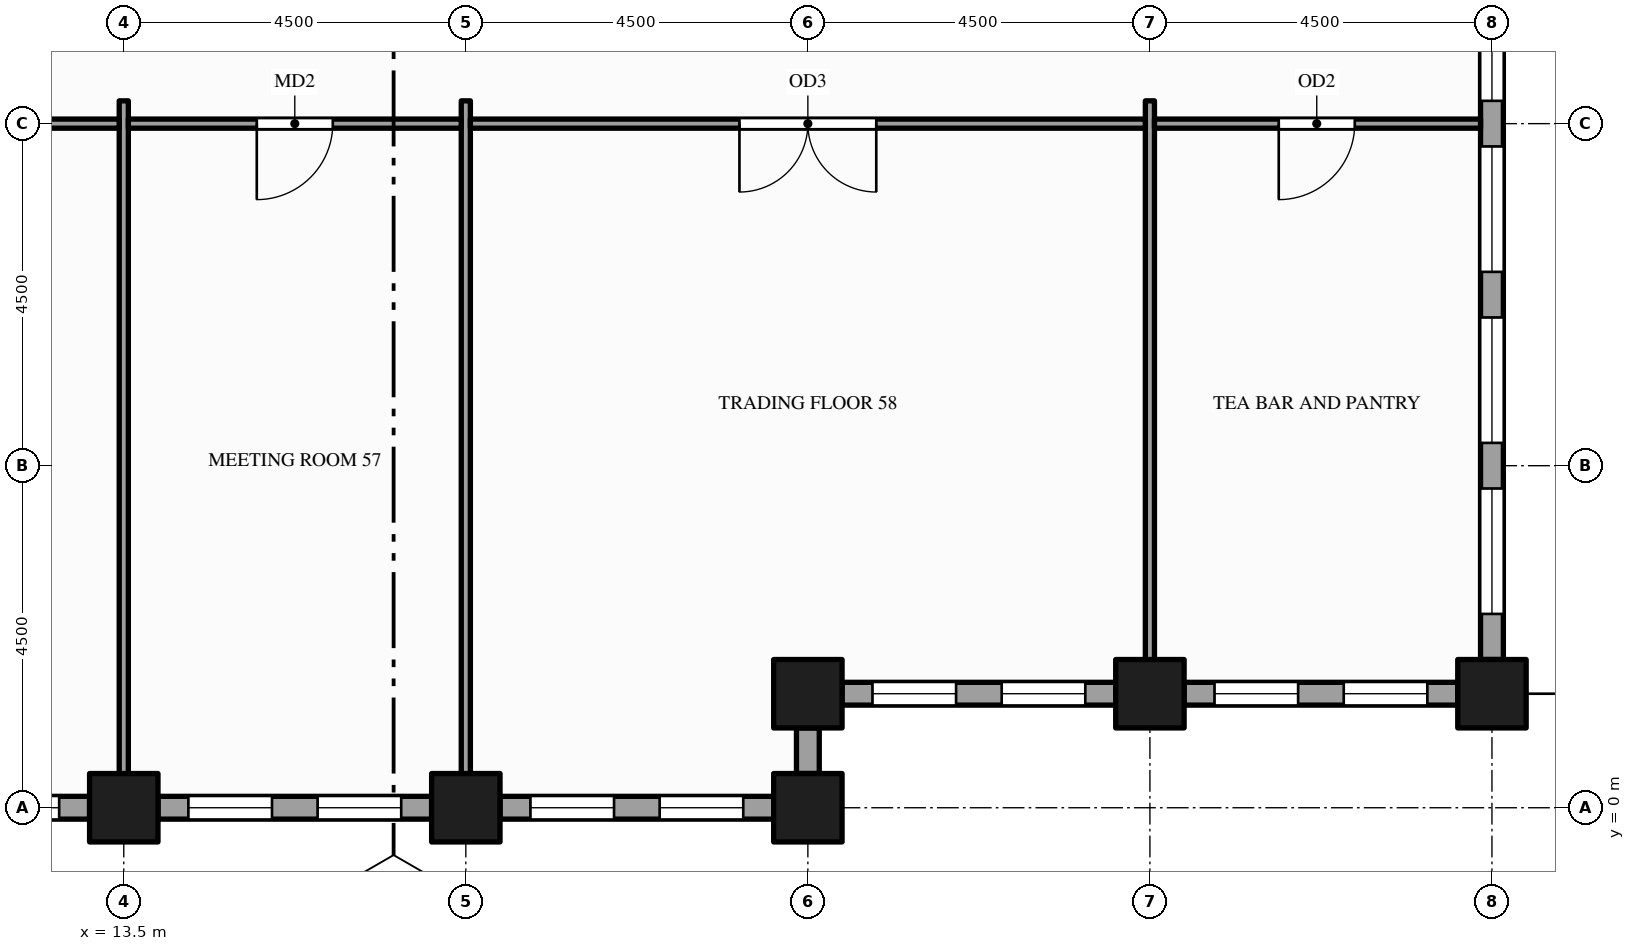
"""IFC4 building model, lengths in metres.
Left out: names, types, materials, properties, quantities, classifications, styles, units other than length and angle.
Written with IfcOpenShell. Run it as: python <this file> out.ifc"""

import sys

from ifc_helpers import new_model, si_unit, direction, frame, frame_2d, origin, origin_2d, place, context, subcontext, project, spatial, rectangle, hollow_rectangle, extrude, element, fill, save


model = new_model("IFC4")
c1 = context("Model", 3, precision=1e-05, world=origin(), true_north=direction((0.0, 1.0)))
c2 = subcontext(c1, "Body", "Model", "MODEL_VIEW")
j1 = project(units=[si_unit("LENGTHUNIT", "METRE"), si_unit("PLANEANGLEUNIT", "RADIAN")], contexts=[c1])
p1 = place(None, origin())
s1 = spatial("IfcSite", under=j1, at=p1, CompositionType="ELEMENT")
p2 = place(p1, origin())
s2 = spatial("IfcBuilding", under=s1, at=p2, CompositionType="ELEMENT")
p3 = place(p2, frame((0.0, 0.0, 147.0)))
s3 = spatial("IfcBuildingStorey", under=s2, at=p3, CompositionType="ELEMENT", Elevation=147.0)
for number, where, z_axis, x_axis in (
    (1, (13.5, 0.0, -0.15), (0.0, 0.0, 1.0), (1.0, 0.0, 0.0)),
    (2, (18.0, 0.0, -0.15), (0.0, 0.0, 1.0), (1.0, 0.0, 0.0)),
    (3, (22.5, 0.0, -0.15), (0.0, 0.0, 1.0), (1.0, 0.0, 0.0)),
    (4, (22.5, 1.5, -0.15), (0.0, 0.0, 1.0), (1.0, 0.0, 0.0)),
    (5, (27.0, 1.5, -0.15), (0.0, 0.0, 1.0), (1.0, 0.0, 0.0)),
    (6, (31.5, 1.5, -0.15), (0.0, 0.0, 1.0), (1.0, 0.0, 0.0)),
):
    element("IfcColumn", number, at=place(p3, frame(where, z_axis=z_axis, x_axis=x_axis)), inside=s3, PredefinedType="COLUMN", context=c2, shape_type="SweptSolid", body=[
        extrude(hollow_rectangle(XDim=0.9, YDim=0.9, WallThickness=0.045, at=origin_2d()), origin(), (0.0, 0.0, 1.0), 4.0),
    ])
p4 = place(p3, frame((9.45, 0.0, 0.0), z_axis=(0.0, 0.0, 1.0), x_axis=(1.0, 0.0, 0.0)))
e7 = element("IfcWall", 7, at=p4, inside=s3, PredefinedType="STANDARD", context=c2, shape_type="SweptSolid", body=[
    extrude(rectangle(XDim=3.6, YDim=0.3, at=frame_2d((1.8, 0.0))), origin(), (0.0, 0.0, 1.0), 2.87),
])
p5 = place(p4, frame((0.4, 0.0, 0.9)))
e8 = element("IfcOpeningElement", 8, at=p5, cuts=e7, PredefinedType="OPENING", context=c2, shape_type="SweptSolid", body=[
    extrude(rectangle(XDim=1.1, YDim=1.75, at=frame_2d((0.55, 0.875))), frame((0.0, 0.16, 0.0), z_axis=(0.0, -1.0, 0.0), x_axis=(1.0, 0.0, 0.0)), (0.0, 0.0, 1.0), 0.32),
])
p6 = place(p4, frame((2.1, 0.0, 0.9)))
e9 = element("IfcOpeningElement", 9, at=p6, cuts=e7, PredefinedType="OPENING", context=c2, shape_type="SweptSolid", body=[
    extrude(rectangle(XDim=1.1, YDim=1.75, at=frame_2d((0.55, 0.875))), frame((0.0, 0.16, 0.0), z_axis=(0.0, -1.0, 0.0), x_axis=(1.0, 0.0, 0.0)), (0.0, 0.0, 1.0), 0.32),
])
p7 = place(p3, frame((13.95, 0.0, 0.0), z_axis=(0.0, 0.0, 1.0), x_axis=(1.0, 0.0, 0.0)))
e10 = element("IfcWall", 10, at=p7, inside=s3, PredefinedType="STANDARD", context=c2, shape_type="SweptSolid", body=[
    extrude(rectangle(XDim=3.6, YDim=0.3, at=frame_2d((1.8, 0.0))), origin(), (0.0, 0.0, 1.0), 2.87),
])
p8 = place(p7, frame((0.4, 0.0, 0.9)))
e11 = element("IfcOpeningElement", 11, at=p8, cuts=e10, PredefinedType="OPENING", context=c2, shape_type="SweptSolid", body=[
    extrude(rectangle(XDim=1.1, YDim=1.75, at=frame_2d((0.55, 0.875))), frame((0.0, 0.16, 0.0), z_axis=(0.0, -1.0, 0.0), x_axis=(1.0, 0.0, 0.0)), (0.0, 0.0, 1.0), 0.32),
])
p9 = place(p7, frame((2.1, 0.0, 0.9)))
e12 = element("IfcOpeningElement", 12, at=p9, cuts=e10, PredefinedType="OPENING", context=c2, shape_type="SweptSolid", body=[
    extrude(rectangle(XDim=1.1, YDim=1.75, at=frame_2d((0.55, 0.875))), frame((0.0, 0.16, 0.0), z_axis=(0.0, -1.0, 0.0), x_axis=(1.0, 0.0, 0.0)), (0.0, 0.0, 1.0), 0.32),
])
p10 = place(p3, frame((18.45, 0.0, 0.0), z_axis=(0.0, 0.0, 1.0), x_axis=(1.0, 0.0, 0.0)))
e13 = element("IfcWall", 13, at=p10, inside=s3, PredefinedType="STANDARD", context=c2, shape_type="SweptSolid", body=[
    extrude(rectangle(XDim=3.6, YDim=0.3, at=frame_2d((1.8, 0.0))), origin(), (0.0, 0.0, 1.0), 2.87),
])
p11 = place(p10, frame((0.4, 0.0, 0.9)))
e14 = element("IfcOpeningElement", 14, at=p11, cuts=e13, PredefinedType="OPENING", context=c2, shape_type="SweptSolid", body=[
    extrude(rectangle(XDim=1.1, YDim=1.75, at=frame_2d((0.55, 0.875))), frame((0.0, 0.16, 0.0), z_axis=(0.0, -1.0, 0.0), x_axis=(1.0, 0.0, 0.0)), (0.0, 0.0, 1.0), 0.32),
])
p12 = place(p10, frame((2.1, 0.0, 0.9)))
e15 = element("IfcOpeningElement", 15, at=p12, cuts=e13, PredefinedType="OPENING", context=c2, shape_type="SweptSolid", body=[
    extrude(rectangle(XDim=1.1, YDim=1.75, at=frame_2d((0.55, 0.875))), frame((0.0, 0.16, 0.0), z_axis=(0.0, -1.0, 0.0), x_axis=(1.0, 0.0, 0.0)), (0.0, 0.0, 1.0), 0.32),
])
p13 = place(p3, frame((22.5, 0.45, 0.0), z_axis=(0.0, 0.0, 1.0), x_axis=(0.0, 1.0, 0.0)))
e16 = element("IfcWall", 16, at=p13, inside=s3, PredefinedType="STANDARD", context=c2, shape_type="SweptSolid", body=[
    extrude(rectangle(XDim=0.6, YDim=0.3, at=frame_2d((0.3, 0.0))), origin(), (0.0, 0.0, 1.0), 3.149),
])
p14 = place(p3, frame((22.95, 1.5, 0.0), z_axis=(0.0, 0.0, 1.0), x_axis=(1.0, 0.0, 0.0)))
e17 = element("IfcWall", 17, at=p14, inside=s3, PredefinedType="STANDARD", context=c2, shape_type="SweptSolid", body=[
    extrude(rectangle(XDim=3.6, YDim=0.3, at=frame_2d((1.8, 0.0))), origin(), (0.0, 0.0, 1.0), 2.87),
])
p15 = place(p14, frame((0.4, 0.0, 0.9)))
e18 = element("IfcOpeningElement", 18, at=p15, cuts=e17, PredefinedType="OPENING", context=c2, shape_type="SweptSolid", body=[
    extrude(rectangle(XDim=1.1, YDim=1.75, at=frame_2d((0.55, 0.875))), frame((0.0, 0.16, 0.0), z_axis=(0.0, -1.0, 0.0), x_axis=(1.0, 0.0, 0.0)), (0.0, 0.0, 1.0), 0.32),
])
p16 = place(p14, frame((2.1, 0.0, 0.9)))
e19 = element("IfcOpeningElement", 19, at=p16, cuts=e17, PredefinedType="OPENING", context=c2, shape_type="SweptSolid", body=[
    extrude(rectangle(XDim=1.1, YDim=1.75, at=frame_2d((0.55, 0.875))), frame((0.0, 0.16, 0.0), z_axis=(0.0, -1.0, 0.0), x_axis=(1.0, 0.0, 0.0)), (0.0, 0.0, 1.0), 0.32),
])
p17 = place(p3, frame((27.45, 1.5, 0.0), z_axis=(0.0, 0.0, 1.0), x_axis=(1.0, 0.0, 0.0)))
e20 = element("IfcWall", 20, at=p17, inside=s3, PredefinedType="STANDARD", context=c2, shape_type="SweptSolid", body=[
    extrude(rectangle(XDim=3.6, YDim=0.3, at=frame_2d((1.8, 0.0))), origin(), (0.0, 0.0, 1.0), 2.87),
])
p18 = place(p17, frame((0.4, 0.0, 0.9)))
e21 = element("IfcOpeningElement", 21, at=p18, cuts=e20, PredefinedType="OPENING", context=c2, shape_type="SweptSolid", body=[
    extrude(rectangle(XDim=1.1, YDim=1.75, at=frame_2d((0.55, 0.875))), frame((0.0, 0.16, 0.0), z_axis=(0.0, -1.0, 0.0), x_axis=(1.0, 0.0, 0.0)), (0.0, 0.0, 1.0), 0.32),
])
p19 = place(p17, frame((2.1, 0.0, 0.9)))
e22 = element("IfcOpeningElement", 22, at=p19, cuts=e20, PredefinedType="OPENING", context=c2, shape_type="SweptSolid", body=[
    extrude(rectangle(XDim=1.1, YDim=1.75, at=frame_2d((0.55, 0.875))), frame((0.0, 0.16, 0.0), z_axis=(0.0, -1.0, 0.0), x_axis=(1.0, 0.0, 0.0)), (0.0, 0.0, 1.0), 0.32),
])
p20 = place(p3, frame((31.5, 1.95, 0.0), z_axis=(0.0, 0.0, 1.0), x_axis=(0.0, 1.0, 0.0)))
e23 = element("IfcWall", 23, at=p20, inside=s3, PredefinedType="STANDARD", context=c2, shape_type="SweptSolid", body=[
    extrude(rectangle(XDim=21.6, YDim=0.3, at=frame_2d((10.8, 0.0))), origin(), (0.0, 0.0, 1.0), 2.87),
])
p21 = place(p20, frame((0.6, 0.0, 0.9)))
e24 = element("IfcOpeningElement", 24, at=p21, cuts=e23, PredefinedType="OPENING", context=c2, shape_type="SweptSolid", body=[
    extrude(rectangle(XDim=1.65, YDim=1.75, at=frame_2d((0.825, 0.875))), frame((0.0, 0.16, 0.0), z_axis=(0.0, -1.0, 0.0), x_axis=(1.0, 0.0, 0.0)), (0.0, 0.0, 1.0), 0.32),
])
p22 = place(p20, frame((2.85, 0.0, 0.9)))
e25 = element("IfcOpeningElement", 25, at=p22, cuts=e23, PredefinedType="OPENING", context=c2, shape_type="SweptSolid", body=[
    extrude(rectangle(XDim=1.65, YDim=1.75, at=frame_2d((0.825, 0.875))), frame((0.0, 0.16, 0.0), z_axis=(0.0, -1.0, 0.0), x_axis=(1.0, 0.0, 0.0)), (0.0, 0.0, 1.0), 0.32),
])
p23 = place(p20, frame((5.1, 0.0, 0.9)))
e26 = element("IfcOpeningElement", 26, at=p23, cuts=e23, PredefinedType="OPENING", context=c2, shape_type="SweptSolid", body=[
    extrude(rectangle(XDim=1.65, YDim=1.75, at=frame_2d((0.825, 0.875))), frame((0.0, 0.16, 0.0), z_axis=(0.0, -1.0, 0.0), x_axis=(1.0, 0.0, 0.0)), (0.0, 0.0, 1.0), 0.32),
])
p24 = place(p20, frame((7.35, 0.0, 0.9)))
e27 = element("IfcOpeningElement", 27, at=p24, cuts=e23, PredefinedType="OPENING", context=c2, shape_type="SweptSolid", body=[
    extrude(rectangle(XDim=1.65, YDim=1.75, at=frame_2d((0.825, 0.875))), frame((0.0, 0.16, 0.0), z_axis=(0.0, -1.0, 0.0), x_axis=(1.0, 0.0, 0.0)), (0.0, 0.0, 1.0), 0.32),
])
p25 = place(p20, frame((9.6, 0.0, 0.9)))
e28 = element("IfcOpeningElement", 28, at=p25, cuts=e23, PredefinedType="OPENING", context=c2, shape_type="SweptSolid", body=[
    extrude(rectangle(XDim=1.65, YDim=1.75, at=frame_2d((0.825, 0.875))), frame((0.0, 0.16, 0.0), z_axis=(0.0, -1.0, 0.0), x_axis=(1.0, 0.0, 0.0)), (0.0, 0.0, 1.0), 0.32),
])
p26 = place(p20, frame((11.85, 0.0, 0.9)))
e29 = element("IfcOpeningElement", 29, at=p26, cuts=e23, PredefinedType="OPENING", context=c2, shape_type="SweptSolid", body=[
    extrude(rectangle(XDim=1.65, YDim=1.75, at=frame_2d((0.825, 0.875))), frame((0.0, 0.16, 0.0), z_axis=(0.0, -1.0, 0.0), x_axis=(1.0, 0.0, 0.0)), (0.0, 0.0, 1.0), 0.32),
])
p27 = place(p20, frame((14.1, 0.0, 0.9)))
e30 = element("IfcOpeningElement", 30, at=p27, cuts=e23, PredefinedType="OPENING", context=c2, shape_type="SweptSolid", body=[
    extrude(rectangle(XDim=1.65, YDim=1.75, at=frame_2d((0.825, 0.875))), frame((0.0, 0.16, 0.0), z_axis=(0.0, -1.0, 0.0), x_axis=(1.0, 0.0, 0.0)), (0.0, 0.0, 1.0), 0.32),
])
p28 = place(p20, frame((16.35, 0.0, 0.9)))
e31 = element("IfcOpeningElement", 31, at=p28, cuts=e23, PredefinedType="OPENING", context=c2, shape_type="SweptSolid", body=[
    extrude(rectangle(XDim=1.65, YDim=1.75, at=frame_2d((0.825, 0.875))), frame((0.0, 0.16, 0.0), z_axis=(0.0, -1.0, 0.0), x_axis=(1.0, 0.0, 0.0)), (0.0, 0.0, 1.0), 0.32),
])
p29 = place(p20, frame((18.6, 0.0, 0.9)))
e32 = element("IfcOpeningElement", 32, at=p29, cuts=e23, PredefinedType="OPENING", context=c2, shape_type="SweptSolid", body=[
    extrude(rectangle(XDim=1.65, YDim=1.75, at=frame_2d((0.825, 0.875))), frame((0.0, 0.16, 0.0), z_axis=(0.0, -1.0, 0.0), x_axis=(1.0, 0.0, 0.0)), (0.0, 0.0, 1.0), 0.32),
])
for number, where, z_axis, x_axis in (
    (33, (13.5, 0.15, 0.0), (0.0, 0.0, 1.0), (0.0, 1.0, 0.0)),
    (34, (18.0, 0.15, 0.0), (0.0, 0.0, 1.0), (0.0, 1.0, 0.0)),
):
    element("IfcWall", number, at=place(p3, frame(where, z_axis=z_axis, x_axis=x_axis)), inside=s3, PredefinedType="PARTITIONING", context=c2, shape_type="SweptSolid", body=[
        extrude(rectangle(XDim=9.15, YDim=0.12, at=frame_2d((4.575, 0.0))), origin(), (0.0, 0.0, 1.0), 2.87),
    ])
p30 = place(p3, frame((27.0, 1.65, 0.0), z_axis=(0.0, 0.0, 1.0), x_axis=(0.0, 1.0, 0.0)))
e35 = element("IfcWall", 35, at=p30, inside=s3, PredefinedType="PARTITIONING", context=c2, shape_type="SweptSolid", body=[
    extrude(rectangle(XDim=7.65, YDim=0.12, at=frame_2d((3.825, 0.0))), origin(), (0.0, 0.0, 1.0), 2.87),
])
p31 = place(p3, frame((9.06, 9.0, 0.0), z_axis=(0.0, 0.0, 1.0), x_axis=(1.0, 0.0, 0.0)))
e36 = element("IfcWall", 36, at=p31, inside=s3, PredefinedType="PARTITIONING", context=c2, shape_type="SweptSolid", body=[
    extrude(rectangle(XDim=4.38, YDim=0.12, at=frame_2d((2.19, 0.0))), origin(), (0.0, 0.0, 1.0), 2.87),
])
p32 = place(p31, frame((1.69, 0.0, 0.0)))
e37 = element("IfcOpeningElement", 37, at=p32, cuts=e36, PredefinedType="OPENING", context=c2, shape_type="SweptSolid", body=[
    extrude(rectangle(XDim=1.0, YDim=2.1, at=frame_2d((0.5, 1.05))), frame((0.0, 0.07, 0.0), z_axis=(0.0, -1.0, 0.0), x_axis=(1.0, 0.0, 0.0)), (0.0, 0.0, 1.0), 0.14),
])
p33 = place(p3, frame((13.56, 9.0, 0.0), z_axis=(0.0, 0.0, 1.0), x_axis=(1.0, 0.0, 0.0)))
e38 = element("IfcWall", 38, at=p33, inside=s3, PredefinedType="PARTITIONING", context=c2, shape_type="SweptSolid", body=[
    extrude(rectangle(XDim=4.38, YDim=0.12, at=frame_2d((2.19, 0.0))), origin(), (0.0, 0.0, 1.0), 2.87),
])
p34 = place(p33, frame((1.69, 0.0, 0.0)))
e39 = element("IfcOpeningElement", 39, at=p34, cuts=e38, PredefinedType="OPENING", context=c2, shape_type="SweptSolid", body=[
    extrude(rectangle(XDim=1.0, YDim=2.1, at=frame_2d((0.5, 1.05))), frame((0.0, 0.07, 0.0), z_axis=(0.0, -1.0, 0.0), x_axis=(1.0, 0.0, 0.0)), (0.0, 0.0, 1.0), 0.14),
])
p35 = place(p3, frame((18.06, 9.0, 0.0), z_axis=(0.0, 0.0, 1.0), x_axis=(1.0, 0.0, 0.0)))
e40 = element("IfcWall", 40, at=p35, inside=s3, PredefinedType="PARTITIONING", context=c2, shape_type="SweptSolid", body=[
    extrude(rectangle(XDim=8.88, YDim=0.12, at=frame_2d((4.44, 0.0))), origin(), (0.0, 0.0, 1.0), 2.87),
])
p36 = place(p35, frame((3.54, 0.0, 0.0)))
e41 = element("IfcOpeningElement", 41, at=p36, cuts=e40, PredefinedType="OPENING", context=c2, shape_type="SweptSolid", body=[
    extrude(rectangle(XDim=1.8, YDim=2.1, at=frame_2d((0.9, 1.05))), frame((0.0, 0.07, 0.0), z_axis=(0.0, -1.0, 0.0), x_axis=(1.0, 0.0, 0.0)), (0.0, 0.0, 1.0), 0.14),
])
p37 = place(p3, frame((27.06, 9.0, 0.0), z_axis=(0.0, 0.0, 1.0), x_axis=(1.0, 0.0, 0.0)))
e42 = element("IfcWall", 42, at=p37, inside=s3, PredefinedType="PARTITIONING", context=c2, shape_type="SweptSolid", body=[
    extrude(rectangle(XDim=4.29, YDim=0.12, at=frame_2d((2.145, 0.0))), origin(), (0.0, 0.0, 1.0), 2.87),
])
p38 = place(p37, frame((1.635, 0.0, 0.0)))
e43 = element("IfcOpeningElement", 43, at=p38, cuts=e42, PredefinedType="OPENING", context=c2, shape_type="SweptSolid", body=[
    extrude(rectangle(XDim=1.0, YDim=2.1, at=frame_2d((0.5, 1.05))), frame((0.0, 0.07, 0.0), z_axis=(0.0, -1.0, 0.0), x_axis=(1.0, 0.0, 0.0)), (0.0, 0.0, 1.0), 0.14),
])
p39 = place(p6, origin())
e44 = element("IfcWindow", 44, at=p39, inside=s3, PartitioningType="SINGLE_PANEL", PredefinedType="WINDOW", context=c2, shape_type="SweptSolid", body=[
    extrude(rectangle(XDim=1.1, YDim=1.75, at=frame_2d((0.55, 0.875))), frame((0.0, 0.03, 0.0), z_axis=(0.0, -1.0, 0.0), x_axis=(1.0, 0.0, 0.0)), (0.0, 0.0, 1.0), 0.06),
])
fill(e9, e44)
p40 = place(p8, origin())
e45 = element("IfcWindow", 45, at=p40, inside=s3, PartitioningType="SINGLE_PANEL", PredefinedType="WINDOW", context=c2, shape_type="SweptSolid", body=[
    extrude(rectangle(XDim=1.1, YDim=1.75, at=frame_2d((0.55, 0.875))), frame((0.0, 0.03, 0.0), z_axis=(0.0, -1.0, 0.0), x_axis=(1.0, 0.0, 0.0)), (0.0, 0.0, 1.0), 0.06),
])
fill(e11, e45)
p41 = place(p9, origin())
e46 = element("IfcWindow", 46, at=p41, inside=s3, PartitioningType="SINGLE_PANEL", PredefinedType="WINDOW", context=c2, shape_type="SweptSolid", body=[
    extrude(rectangle(XDim=1.1, YDim=1.75, at=frame_2d((0.55, 0.875))), frame((0.0, 0.03, 0.0), z_axis=(0.0, -1.0, 0.0), x_axis=(1.0, 0.0, 0.0)), (0.0, 0.0, 1.0), 0.06),
])
fill(e12, e46)
p42 = place(p11, origin())
e47 = element("IfcWindow", 47, at=p42, inside=s3, PartitioningType="SINGLE_PANEL", PredefinedType="WINDOW", context=c2, shape_type="SweptSolid", body=[
    extrude(rectangle(XDim=1.1, YDim=1.75, at=frame_2d((0.55, 0.875))), frame((0.0, 0.03, 0.0), z_axis=(0.0, -1.0, 0.0), x_axis=(1.0, 0.0, 0.0)), (0.0, 0.0, 1.0), 0.06),
])
fill(e14, e47)
p43 = place(p12, origin())
e48 = element("IfcWindow", 48, at=p43, inside=s3, PartitioningType="SINGLE_PANEL", PredefinedType="WINDOW", context=c2, shape_type="SweptSolid", body=[
    extrude(rectangle(XDim=1.1, YDim=1.75, at=frame_2d((0.55, 0.875))), frame((0.0, 0.03, 0.0), z_axis=(0.0, -1.0, 0.0), x_axis=(1.0, 0.0, 0.0)), (0.0, 0.0, 1.0), 0.06),
])
fill(e15, e48)
p44 = place(p15, origin())
e49 = element("IfcWindow", 49, at=p44, inside=s3, PartitioningType="SINGLE_PANEL", PredefinedType="WINDOW", context=c2, shape_type="SweptSolid", body=[
    extrude(rectangle(XDim=1.1, YDim=1.75, at=frame_2d((0.55, 0.875))), frame((0.0, 0.03, 0.0), z_axis=(0.0, -1.0, 0.0), x_axis=(1.0, 0.0, 0.0)), (0.0, 0.0, 1.0), 0.06),
])
fill(e18, e49)
p45 = place(p16, origin())
e50 = element("IfcWindow", 50, at=p45, inside=s3, PartitioningType="SINGLE_PANEL", PredefinedType="WINDOW", context=c2, shape_type="SweptSolid", body=[
    extrude(rectangle(XDim=1.1, YDim=1.75, at=frame_2d((0.55, 0.875))), frame((0.0, 0.03, 0.0), z_axis=(0.0, -1.0, 0.0), x_axis=(1.0, 0.0, 0.0)), (0.0, 0.0, 1.0), 0.06),
])
fill(e19, e50)
p46 = place(p18, origin())
e51 = element("IfcWindow", 51, at=p46, inside=s3, PartitioningType="SINGLE_PANEL", PredefinedType="WINDOW", context=c2, shape_type="SweptSolid", body=[
    extrude(rectangle(XDim=1.1, YDim=1.75, at=frame_2d((0.55, 0.875))), frame((0.0, 0.03, 0.0), z_axis=(0.0, -1.0, 0.0), x_axis=(1.0, 0.0, 0.0)), (0.0, 0.0, 1.0), 0.06),
])
fill(e21, e51)
p47 = place(p19, origin())
e52 = element("IfcWindow", 52, at=p47, inside=s3, PartitioningType="SINGLE_PANEL", PredefinedType="WINDOW", context=c2, shape_type="SweptSolid", body=[
    extrude(rectangle(XDim=1.1, YDim=1.75, at=frame_2d((0.55, 0.875))), frame((0.0, 0.03, 0.0), z_axis=(0.0, -1.0, 0.0), x_axis=(1.0, 0.0, 0.0)), (0.0, 0.0, 1.0), 0.06),
])
fill(e22, e52)
p48 = place(p21, origin())
e53 = element("IfcWindow", 53, at=p48, inside=s3, PartitioningType="SINGLE_PANEL", PredefinedType="WINDOW", context=c2, shape_type="SweptSolid", body=[
    extrude(rectangle(XDim=1.65, YDim=1.75, at=frame_2d((0.825, 0.875))), frame((0.0, 0.03, 0.0), z_axis=(0.0, -1.0, 0.0), x_axis=(1.0, 0.0, 0.0)), (0.0, 0.0, 1.0), 0.06),
])
fill(e24, e53)
p49 = place(p22, origin())
e54 = element("IfcWindow", 54, at=p49, inside=s3, PartitioningType="SINGLE_PANEL", PredefinedType="WINDOW", context=c2, shape_type="SweptSolid", body=[
    extrude(rectangle(XDim=1.65, YDim=1.75, at=frame_2d((0.825, 0.875))), frame((0.0, 0.03, 0.0), z_axis=(0.0, -1.0, 0.0), x_axis=(1.0, 0.0, 0.0)), (0.0, 0.0, 1.0), 0.06),
])
fill(e25, e54)
p50 = place(p23, origin())
e55 = element("IfcWindow", 55, at=p50, inside=s3, PartitioningType="SINGLE_PANEL", PredefinedType="WINDOW", context=c2, shape_type="SweptSolid", body=[
    extrude(rectangle(XDim=1.65, YDim=1.75, at=frame_2d((0.825, 0.875))), frame((0.0, 0.03, 0.0), z_axis=(0.0, -1.0, 0.0), x_axis=(1.0, 0.0, 0.0)), (0.0, 0.0, 1.0), 0.06),
])
fill(e26, e55)
p51 = place(p24, origin())
e56 = element("IfcWindow", 56, at=p51, inside=s3, PartitioningType="SINGLE_PANEL", PredefinedType="WINDOW", context=c2, shape_type="SweptSolid", body=[
    extrude(rectangle(XDim=1.65, YDim=1.75, at=frame_2d((0.825, 0.875))), frame((0.0, 0.03, 0.0), z_axis=(0.0, -1.0, 0.0), x_axis=(1.0, 0.0, 0.0)), (0.0, 0.0, 1.0), 0.06),
])
fill(e27, e56)
p52 = place(p34, origin())
e57 = element("IfcDoor", 57, at=p52, inside=s3, OperationType="SINGLE_SWING_LEFT", PredefinedType="DOOR", context=c2, shape_type="SweptSolid", body=[
    extrude(rectangle(XDim=1.0, YDim=2.1, at=frame_2d((0.5, 1.05))), frame((0.0, 0.025, 0.0), z_axis=(0.0, -1.0, 0.0), x_axis=(1.0, 0.0, 0.0)), (0.0, 0.0, 1.0), 0.05),
])
fill(e39, e57)
p53 = place(p36, origin())
e58 = element("IfcDoor", 58, at=p53, inside=s3, OperationType="DOUBLE_DOOR_SINGLE_SWING", PredefinedType="DOOR", context=c2, shape_type="SweptSolid", body=[
    extrude(rectangle(XDim=1.8, YDim=2.1, at=frame_2d((0.9, 1.05))), frame((0.0, 0.025, 0.0), z_axis=(0.0, -1.0, 0.0), x_axis=(1.0, 0.0, 0.0)), (0.0, 0.0, 1.0), 0.05),
])
fill(e41, e58)
p54 = place(p38, origin())
e59 = element("IfcDoor", 59, at=p54, inside=s3, OperationType="SINGLE_SWING_LEFT", PredefinedType="DOOR", context=c2, shape_type="SweptSolid", body=[
    extrude(rectangle(XDim=1.0, YDim=2.1, at=frame_2d((0.5, 1.05))), frame((0.0, 0.025, 0.0), z_axis=(0.0, -1.0, 0.0), x_axis=(1.0, 0.0, 0.0)), (0.0, 0.0, 1.0), 0.05),
])
fill(e43, e59)
save(model, sys.argv[1])
